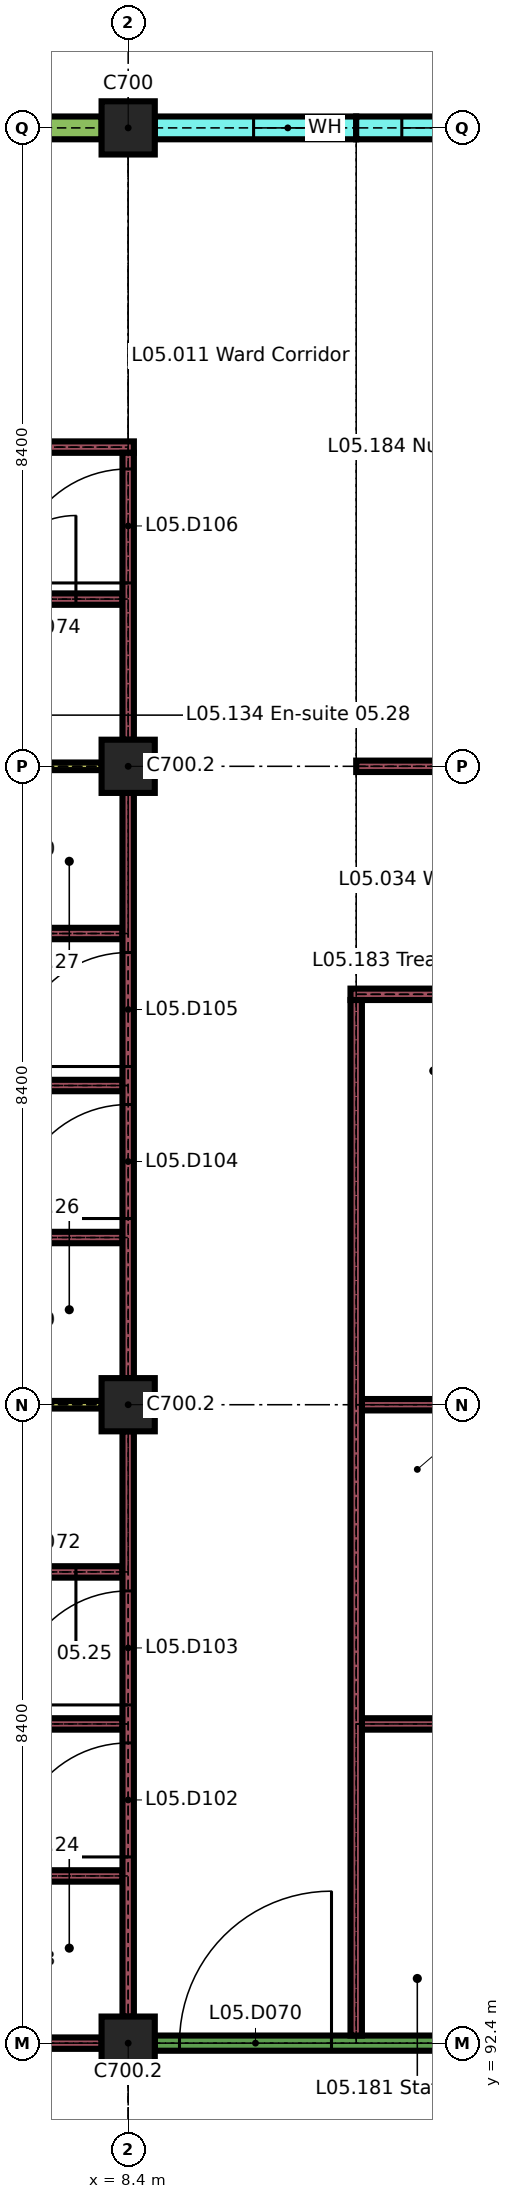
"""IFC4 building model, lengths in metres.
Left out: names, types, materials, properties, quantities, classifications, styles, units other than length and angle.
Written with IfcOpenShell. Run it as: python <this file> out.ifc"""

import sys

from ifc_helpers import new_model, si_unit, direction, frame, frame_2d, origin, origin_2d, place, context, subcontext, project, spatial, rectangle, extrude, element, fill, save


model = new_model("IFC4")
c1 = context("Model", 3, precision=1e-05, world=origin(), true_north=direction((0.0, 1.0)))
c2 = subcontext(c1, "Body", "Model", "MODEL_VIEW")
j1 = project(units=[si_unit("LENGTHUNIT", "METRE"), si_unit("PLANEANGLEUNIT", "RADIAN")], contexts=[c1])
p1 = place(None, origin())
s1 = spatial("IfcSite", under=j1, at=p1, CompositionType="ELEMENT")
p2 = place(p1, origin())
s2 = spatial("IfcBuilding", under=s1, at=p2, CompositionType="ELEMENT")
p3 = place(p2, frame((0.0, 0.0, 22.5)))
s3 = spatial("IfcBuildingStorey", under=s2, at=p3, CompositionType="ELEMENT", Elevation=22.5)
for number, where, z_axis, x_axis in (
    (1, (8.4, 92.4, 0.0), (0.0, 0.0, 1.0), (1.0, 0.0, 0.0)),
    (2, (8.4, 100.8, 0.0), (0.0, 0.0, 1.0), (1.0, 0.0, 0.0)),
    (3, (8.4, 109.2, 0.0), (0.0, 0.0, 1.0), (1.0, 0.0, 0.0)),
    (4, (8.4, 117.6, 0.0), (0.0, 0.0, 1.0), (1.0, 0.0, 0.0)),
):
    element("IfcColumn", number, at=place(p3, frame(where, z_axis=z_axis, x_axis=x_axis)), inside=s3, PredefinedType="COLUMN", context=c2, shape_type="SweptSolid", body=[
        extrude(rectangle(XDim=0.7, YDim=0.7, at=origin_2d()), origin(), (0.0, 0.0, 1.0), 3.26),
    ])
p4 = place(p3, frame((0.35, 117.6, 0.0), z_axis=(0.0, 0.0, 1.0), x_axis=(1.0, 0.0, 0.0)))
e5 = element("IfcWall", 5, at=p4, inside=s3, PredefinedType="SOLIDWALL", context=c2, shape_type="SweptSolid", body=[
    extrude(rectangle(XDim=7.7, YDim=0.3, at=frame_2d((3.85, 0.0))), origin(), (0.0, 0.0, 1.0), 2.96),
])
p5 = place(p4, frame((0.85, 0.0, 1.05)))
e6 = element("IfcOpeningElement", 6, at=p5, cuts=e5, PredefinedType="OPENING", context=c2, shape_type="SweptSolid", body=[
    extrude(rectangle(XDim=1.8, YDim=1.2, at=frame_2d((0.9, 0.6))), frame((0.0, 0.16, 0.0), z_axis=(0.0, -1.0, 0.0), x_axis=(1.0, 0.0, 0.0)), (0.0, 0.0, 1.0), 0.32),
])
p6 = place(p4, frame((5.05, 0.0, 1.05)))
e7 = element("IfcOpeningElement", 7, at=p6, cuts=e5, PredefinedType="OPENING", context=c2, shape_type="SweptSolid", body=[
    extrude(rectangle(XDim=1.8, YDim=1.2, at=frame_2d((0.9, 0.6))), frame((0.0, 0.16, 0.0), z_axis=(0.0, -1.0, 0.0), x_axis=(1.0, 0.0, 0.0)), (0.0, 0.0, 1.0), 0.32),
])
p7 = place(p3, frame((8.75, 117.6, 0.0), z_axis=(0.0, 0.0, 1.0), x_axis=(1.0, 0.0, 0.0)))
e8 = element("IfcWall", 8, at=p7, inside=s3, PredefinedType="SOLIDWALL", context=c2, shape_type="SweptSolid", body=[
    extrude(rectangle(XDim=2.65, YDim=0.3, at=frame_2d((1.325, 0.0))), origin(), (0.0, 0.0, 1.0), 3.26),
])
p8 = place(p7, frame((1.3, 0.0, 0.9)))
e9 = element("IfcOpeningElement", 9, at=p8, cuts=e8, PredefinedType="OPENING", context=c2, shape_type="SweptSolid", body=[
    extrude(rectangle(XDim=0.9, YDim=1.5, at=frame_2d((0.45, 0.75))), frame((0.0, 0.16, 0.0), z_axis=(0.0, -1.0, 0.0), x_axis=(1.0, 0.0, 0.0)), (0.0, 0.0, 1.0), 0.32),
])
p9 = place(p3, frame((11.4, 117.6, 0.0), z_axis=(0.0, 0.0, 1.0), x_axis=(1.0, 0.0, 0.0)))
e10 = element("IfcWall", 10, at=p9, inside=s3, PredefinedType="SOLIDWALL", context=c2, shape_type="SweptSolid", body=[
    extrude(rectangle(XDim=2.4, YDim=0.3, at=frame_2d((1.2, 0.0))), origin(), (0.0, 0.0, 1.0), 3.26),
])
p10 = place(p9, frame((0.6, 0.0, 0.9)))
e11 = element("IfcOpeningElement", 11, at=p10, cuts=e10, PredefinedType="OPENING", context=c2, shape_type="SweptSolid", body=[
    extrude(rectangle(XDim=1.2, YDim=1.5, at=frame_2d((0.6, 0.75))), frame((0.0, 0.16, 0.0), z_axis=(0.0, -1.0, 0.0), x_axis=(1.0, 0.0, 0.0)), (0.0, 0.0, 1.0), 0.32),
])
p11 = place(p3, frame((0.35, 92.4, 0.0), z_axis=(0.0, 0.0, 1.0), x_axis=(1.0, 0.0, 0.0)))
e12 = element("IfcWall", 12, at=p11, inside=s3, PredefinedType="PARTITIONING", context=c2, shape_type="SweptSolid", body=[
    extrude(rectangle(XDim=7.7, YDim=0.15, at=frame_2d((3.85, 0.0))), origin(), (0.0, 0.0, 1.0), 3.26),
])
p12 = place(p3, frame((8.75, 92.4, 0.0), z_axis=(0.0, 0.0, 1.0), x_axis=(1.0, 0.0, 0.0)))
e13 = element("IfcWall", 13, at=p12, inside=s3, PredefinedType="PARTITIONING", context=c2, shape_type="SweptSolid", body=[
    extrude(rectangle(XDim=7.7, YDim=0.2, at=frame_2d((3.85, 0.0))), origin(), (0.0, 0.0, 1.0), 3.26),
])
p13 = place(p12, frame((0.325, 0.0, 0.0)))
e14 = element("IfcOpeningElement", 14, at=p13, cuts=e13, PredefinedType="OPENING", context=c2, shape_type="SweptSolid", body=[
    extrude(rectangle(XDim=2.0, YDim=2.4, at=frame_2d((1.0, 1.2))), frame((0.0, 0.11, 0.0), z_axis=(0.0, -1.0, 0.0), x_axis=(1.0, 0.0, 0.0)), (0.0, 0.0, 1.0), 0.22),
])
p14 = place(p12, frame((5.375, 0.0, 0.0)))
e15 = element("IfcOpeningElement", 15, at=p14, cuts=e13, PredefinedType="OPENING", context=c2, shape_type="SweptSolid", body=[
    extrude(rectangle(XDim=2.0, YDim=2.4, at=frame_2d((1.0, 1.2))), frame((0.0, 0.11, 0.0), z_axis=(0.0, -1.0, 0.0), x_axis=(1.0, 0.0, 0.0)), (0.0, 0.0, 1.0), 0.22),
])
p15 = place(p3, frame((5.925, 94.6, 0.0), z_axis=(0.0, 0.0, 1.0), x_axis=(1.0, 0.0, 0.0)))
e16 = element("IfcWall", 16, at=p15, inside=s3, PredefinedType="PARTITIONING", context=c2, shape_type="SweptSolid", body=[
    extrude(rectangle(XDim=2.4, YDim=0.15, at=frame_2d((1.2, 0.0))), origin(), (0.0, 0.0, 1.0), 3.26),
])
p16 = place(p3, frame((0.15, 96.6, 0.0), z_axis=(0.0, 0.0, 1.0), x_axis=(1.0, 0.0, 0.0)))
e17 = element("IfcWall", 17, at=p16, inside=s3, PredefinedType="PARTITIONING", context=c2, shape_type="SweptSolid", body=[
    extrude(rectangle(XDim=8.175, YDim=0.15, at=frame_2d((4.087, 0.0))), origin(), (0.0, 0.0, 1.0), 3.26),
])
p17 = place(p3, frame((11.475, 96.6, 0.0), z_axis=(0.0, 0.0, 1.0), x_axis=(1.0, 0.0, 0.0)))
e18 = element("IfcWall", 18, at=p17, inside=s3, PredefinedType="PARTITIONING", context=c2, shape_type="SweptSolid", body=[
    extrude(rectangle(XDim=2.25, YDim=0.15, at=frame_2d((1.125, 0.0))), origin(), (0.0, 0.0, 1.0), 3.26),
])
p18 = place(p3, frame((5.925, 98.6, 0.0), z_axis=(0.0, 0.0, 1.0), x_axis=(1.0, 0.0, 0.0)))
e19 = element("IfcWall", 19, at=p18, inside=s3, PredefinedType="PARTITIONING", context=c2, shape_type="SweptSolid", body=[
    extrude(rectangle(XDim=2.4, YDim=0.15, at=frame_2d((1.2, 0.0))), origin(), (0.0, 0.0, 1.0), 3.26),
])
p19 = place(p18, frame((0.688, 0.0, 0.0)))
e20 = element("IfcOpeningElement", 20, at=p19, cuts=e19, PredefinedType="OPENING", context=c2, shape_type="SweptSolid", body=[
    extrude(rectangle(XDim=1.1, YDim=2.1, at=frame_2d((0.55, 1.05))), frame((0.0, 0.085, 0.0), z_axis=(0.0, -1.0, 0.0), x_axis=(1.0, 0.0, 0.0)), (0.0, 0.0, 1.0), 0.17),
])
p20 = place(p3, frame((6.0, 100.8, 0.0), z_axis=(0.0, 0.0, 1.0), x_axis=(1.0, 0.0, 0.0)))
e21 = element("IfcWall", 21, at=p20, inside=s3, PredefinedType="PARTITIONING", context=c2, shape_type="SweptSolid", body=[
    extrude(rectangle(XDim=2.05, YDim=0.1, at=frame_2d((1.025, 0.0))), origin(), (0.0, 0.0, 1.0), 3.26),
])
p21 = place(p3, frame((11.475, 100.8, 0.0), z_axis=(0.0, 0.0, 1.0), x_axis=(1.0, 0.0, 0.0)))
e22 = element("IfcWall", 22, at=p21, inside=s3, PredefinedType="PARTITIONING", context=c2, shape_type="SweptSolid", body=[
    extrude(rectangle(XDim=2.25, YDim=0.15, at=frame_2d((1.125, 0.0))), origin(), (0.0, 0.0, 1.0), 3.26),
])
p22 = place(p3, frame((5.925, 103.0, 0.0), z_axis=(0.0, 0.0, 1.0), x_axis=(1.0, 0.0, 0.0)))
e23 = element("IfcWall", 23, at=p22, inside=s3, PredefinedType="PARTITIONING", context=c2, shape_type="SweptSolid", body=[
    extrude(rectangle(XDim=2.4, YDim=0.15, at=frame_2d((1.2, 0.0))), origin(), (0.0, 0.0, 1.0), 3.26),
])
p23 = place(p3, frame((0.15, 105.0, 0.0), z_axis=(0.0, 0.0, 1.0), x_axis=(1.0, 0.0, 0.0)))
e24 = element("IfcWall", 24, at=p23, inside=s3, PredefinedType="PARTITIONING", context=c2, shape_type="SweptSolid", body=[
    extrude(rectangle(XDim=8.175, YDim=0.15, at=frame_2d((4.087, 0.0))), origin(), (0.0, 0.0, 1.0), 3.26),
])
p24 = place(p3, frame((11.325, 106.2, 0.0), z_axis=(0.0, 0.0, 1.0), x_axis=(1.0, 0.0, 0.0)))
e25 = element("IfcWall", 25, at=p24, inside=s3, PredefinedType="PARTITIONING", context=c2, shape_type="SweptSolid", body=[
    extrude(rectangle(XDim=2.55, YDim=0.15, at=frame_2d((1.275, 0.0))), origin(), (0.0, 0.0, 1.0), 3.26),
])
p25 = place(p3, frame((5.925, 107.0, 0.0), z_axis=(0.0, 0.0, 1.0), x_axis=(1.0, 0.0, 0.0)))
e26 = element("IfcWall", 26, at=p25, inside=s3, PredefinedType="PARTITIONING", context=c2, shape_type="SweptSolid", body=[
    extrude(rectangle(XDim=2.4, YDim=0.15, at=frame_2d((1.2, 0.0))), origin(), (0.0, 0.0, 1.0), 3.26),
])
p26 = place(p3, frame((6.0, 109.2, 0.0), z_axis=(0.0, 0.0, 1.0), x_axis=(1.0, 0.0, 0.0)))
e27 = element("IfcWall", 27, at=p26, inside=s3, PredefinedType="PARTITIONING", context=c2, shape_type="SweptSolid", body=[
    extrude(rectangle(XDim=2.05, YDim=0.1, at=frame_2d((1.025, 0.0))), origin(), (0.0, 0.0, 1.0), 3.26),
])
p27 = place(p3, frame((11.4, 109.2, 0.0), z_axis=(0.0, 0.0, 1.0), x_axis=(1.0, 0.0, 0.0)))
e28 = element("IfcWall", 28, at=p27, inside=s3, PredefinedType="PARTITIONING", context=c2, shape_type="SweptSolid", body=[
    extrude(rectangle(XDim=2.475, YDim=0.15, at=frame_2d((1.238, 0.0))), origin(), (0.0, 0.0, 1.0), 3.26),
])
p28 = place(p3, frame((5.925, 111.4, 0.0), z_axis=(0.0, 0.0, 1.0), x_axis=(1.0, 0.0, 0.0)))
e29 = element("IfcWall", 29, at=p28, inside=s3, PredefinedType="PARTITIONING", context=c2, shape_type="SweptSolid", body=[
    extrude(rectangle(XDim=2.4, YDim=0.15, at=frame_2d((1.2, 0.0))), origin(), (0.0, 0.0, 1.0), 3.26),
])
p29 = place(p28, frame((0.688, 0.0, 0.0)))
e30 = element("IfcOpeningElement", 30, at=p29, cuts=e29, PredefinedType="OPENING", context=c2, shape_type="SweptSolid", body=[
    extrude(rectangle(XDim=1.1, YDim=2.1, at=frame_2d((0.55, 1.05))), frame((0.0, 0.085, 0.0), z_axis=(0.0, -1.0, 0.0), x_axis=(1.0, 0.0, 0.0)), (0.0, 0.0, 1.0), 0.17),
])
p30 = place(p3, frame((0.15, 113.4, 0.0), z_axis=(0.0, 0.0, 1.0), x_axis=(1.0, 0.0, 0.0)))
e31 = element("IfcWall", 31, at=p30, inside=s3, PredefinedType="PARTITIONING", context=c2, shape_type="SweptSolid", body=[
    extrude(rectangle(XDim=8.325, YDim=0.15, at=frame_2d((4.163, 0.0))), origin(), (0.0, 0.0, 1.0), 3.26),
])
p31 = place(p3, frame((8.4, 92.75, 0.0), z_axis=(0.0, 0.0, 1.0), x_axis=(0.0, 1.0, 0.0)))
e32 = element("IfcWall", 32, at=p31, inside=s3, PredefinedType="PARTITIONING", context=c2, shape_type="SweptSolid", body=[
    extrude(rectangle(XDim=7.7, YDim=0.15, at=frame_2d((3.85, 0.0))), origin(), (0.0, 0.0, 1.0), 3.26),
])
p32 = place(p31, frame((2.1, 0.0, 0.0)))
e33 = element("IfcOpeningElement", 33, at=p32, cuts=e32, PredefinedType="OPENING", context=c2, shape_type="SweptSolid", body=[
    extrude(rectangle(XDim=1.5, YDim=2.4, at=frame_2d((0.75, 1.2))), frame((0.0, 0.085, 0.0), z_axis=(0.0, -1.0, 0.0), x_axis=(1.0, 0.0, 0.0)), (0.0, 0.0, 1.0), 0.17),
])
p33 = place(p31, frame((4.1, 0.0, 0.0)))
e34 = element("IfcOpeningElement", 34, at=p33, cuts=e32, PredefinedType="OPENING", context=c2, shape_type="SweptSolid", body=[
    extrude(rectangle(XDim=1.5, YDim=2.4, at=frame_2d((0.75, 1.2))), frame((0.0, 0.085, 0.0), z_axis=(0.0, -1.0, 0.0), x_axis=(1.0, 0.0, 0.0)), (0.0, 0.0, 1.0), 0.17),
])
p34 = place(p3, frame((8.4, 101.15, 0.0), z_axis=(0.0, 0.0, 1.0), x_axis=(0.0, 1.0, 0.0)))
e35 = element("IfcWall", 35, at=p34, inside=s3, PredefinedType="PARTITIONING", context=c2, shape_type="SweptSolid", body=[
    extrude(rectangle(XDim=7.7, YDim=0.15, at=frame_2d((3.85, 0.0))), origin(), (0.0, 0.0, 1.0), 3.26),
])
p35 = place(p34, frame((2.1, 0.0, 0.0)))
e36 = element("IfcOpeningElement", 36, at=p35, cuts=e35, PredefinedType="OPENING", context=c2, shape_type="SweptSolid", body=[
    extrude(rectangle(XDim=1.5, YDim=2.4, at=frame_2d((0.75, 1.2))), frame((0.0, 0.085, 0.0), z_axis=(0.0, -1.0, 0.0), x_axis=(1.0, 0.0, 0.0)), (0.0, 0.0, 1.0), 0.17),
])
p36 = place(p34, frame((4.1, 0.0, 0.0)))
e37 = element("IfcOpeningElement", 37, at=p36, cuts=e35, PredefinedType="OPENING", context=c2, shape_type="SweptSolid", body=[
    extrude(rectangle(XDim=1.5, YDim=2.4, at=frame_2d((0.75, 1.2))), frame((0.0, 0.085, 0.0), z_axis=(0.0, -1.0, 0.0), x_axis=(1.0, 0.0, 0.0)), (0.0, 0.0, 1.0), 0.17),
])
p37 = place(p3, frame((8.4, 109.55, 0.0), z_axis=(0.0, 0.0, 1.0), x_axis=(0.0, 1.0, 0.0)))
e38 = element("IfcWall", 38, at=p37, inside=s3, PredefinedType="PARTITIONING", context=c2, shape_type="SweptSolid", body=[
    extrude(rectangle(XDim=3.775, YDim=0.15, at=frame_2d((1.887, 0.0))), origin(), (0.0, 0.0, 1.0), 3.26),
])
p38 = place(p37, frame((2.062, 0.0, 0.0)))
e39 = element("IfcOpeningElement", 39, at=p38, cuts=e38, PredefinedType="OPENING", context=c2, shape_type="SweptSolid", body=[
    extrude(rectangle(XDim=1.5, YDim=2.4, at=frame_2d((0.75, 1.2))), frame((0.0, 0.085, 0.0), z_axis=(0.0, -1.0, 0.0), x_axis=(1.0, 0.0, 0.0)), (0.0, 0.0, 1.0), 0.17),
])
p39 = place(p3, frame((11.4, 92.5, 0.0), z_axis=(0.0, 0.0, 1.0), x_axis=(0.0, 1.0, 0.0)))
e40 = element("IfcWall", 40, at=p39, inside=s3, PredefinedType="PARTITIONING", context=c2, shape_type="SweptSolid", body=[
    extrude(rectangle(XDim=13.625, YDim=0.15, at=frame_2d((6.812, 0.0))), origin(), (0.0, 0.0, 1.0), 3.26),
])
p40 = place(p8, origin())
e41 = element("IfcWindow", 41, at=p40, inside=s3, PartitioningType="SINGLE_PANEL", PredefinedType="WINDOW", context=c2, shape_type="SweptSolid", body=[
    extrude(rectangle(XDim=0.9, YDim=1.5, at=frame_2d((0.45, 0.75))), frame((0.0, 0.03, 0.0), z_axis=(0.0, -1.0, 0.0), x_axis=(1.0, 0.0, 0.0)), (0.0, 0.0, 1.0), 0.06),
])
fill(e9, e41)
p41 = place(p10, origin())
e42 = element("IfcWindow", 42, at=p41, inside=s3, PartitioningType="SINGLE_PANEL", PredefinedType="WINDOW", context=c2, shape_type="SweptSolid", body=[
    extrude(rectangle(XDim=1.2, YDim=1.5, at=frame_2d((0.6, 0.75))), frame((0.0, 0.03, 0.0), z_axis=(0.0, -1.0, 0.0), x_axis=(1.0, 0.0, 0.0)), (0.0, 0.0, 1.0), 0.06),
])
fill(e11, e42)
p42 = place(p13, origin())
e43 = element("IfcDoor", 43, at=p42, inside=s3, OperationType="SINGLE_SWING_LEFT", PredefinedType="DOOR", context=c2, shape_type="SweptSolid", body=[
    extrude(rectangle(XDim=2.0, YDim=2.4, at=frame_2d((1.0, 1.2))), frame((0.0, 0.03, 0.0), z_axis=(0.0, -1.0, 0.0), x_axis=(1.0, 0.0, 0.0)), (0.0, 0.0, 1.0), 0.06),
])
fill(e14, e43)
p43 = place(p19, origin())
e44 = element("IfcDoor", 44, at=p43, inside=s3, OperationType="SINGLE_SWING_RIGHT", PredefinedType="DOOR", context=c2, shape_type="SweptSolid", body=[
    extrude(rectangle(XDim=1.1, YDim=2.1, at=frame_2d((0.55, 1.05))), frame((0.0, 0.025, 0.0), z_axis=(0.0, -1.0, 0.0), x_axis=(1.0, 0.0, 0.0)), (0.0, 0.0, 1.0), 0.05),
])
fill(e20, e44)
p44 = place(p29, origin())
e45 = element("IfcDoor", 45, at=p44, inside=s3, OperationType="SINGLE_SWING_LEFT", PredefinedType="DOOR", context=c2, shape_type="SweptSolid", body=[
    extrude(rectangle(XDim=1.1, YDim=2.1, at=frame_2d((0.55, 1.05))), frame((0.0, 0.025, 0.0), z_axis=(0.0, -1.0, 0.0), x_axis=(1.0, 0.0, 0.0)), (0.0, 0.0, 1.0), 0.05),
])
fill(e30, e45)
p45 = place(p32, origin())
e46 = element("IfcDoor", 46, at=p45, inside=s3, OperationType="SINGLE_SWING_RIGHT", PredefinedType="DOOR", context=c2, shape_type="SweptSolid", body=[
    extrude(rectangle(XDim=1.5, YDim=2.4, at=frame_2d((0.75, 1.2))), frame((0.0, 0.03, 0.0), z_axis=(0.0, -1.0, 0.0), x_axis=(1.0, 0.0, 0.0)), (0.0, 0.0, 1.0), 0.06),
])
fill(e33, e46)
p46 = place(p33, origin())
e47 = element("IfcDoor", 47, at=p46, inside=s3, OperationType="SINGLE_SWING_RIGHT", PredefinedType="DOOR", context=c2, shape_type="SweptSolid", body=[
    extrude(rectangle(XDim=1.5, YDim=2.4, at=frame_2d((0.75, 1.2))), frame((0.0, 0.03, 0.0), z_axis=(0.0, -1.0, 0.0), x_axis=(1.0, 0.0, 0.0)), (0.0, 0.0, 1.0), 0.06),
])
fill(e34, e47)
p47 = place(p35, origin())
e48 = element("IfcDoor", 48, at=p47, inside=s3, OperationType="SINGLE_SWING_RIGHT", PredefinedType="DOOR", context=c2, shape_type="SweptSolid", body=[
    extrude(rectangle(XDim=1.5, YDim=2.4, at=frame_2d((0.75, 1.2))), frame((0.0, 0.03, 0.0), z_axis=(0.0, -1.0, 0.0), x_axis=(1.0, 0.0, 0.0)), (0.0, 0.0, 1.0), 0.06),
])
fill(e36, e48)
p48 = place(p36, origin())
e49 = element("IfcDoor", 49, at=p48, inside=s3, OperationType="SINGLE_SWING_RIGHT", PredefinedType="DOOR", context=c2, shape_type="SweptSolid", body=[
    extrude(rectangle(XDim=1.5, YDim=2.4, at=frame_2d((0.75, 1.2))), frame((0.0, 0.03, 0.0), z_axis=(0.0, -1.0, 0.0), x_axis=(1.0, 0.0, 0.0)), (0.0, 0.0, 1.0), 0.06),
])
fill(e37, e49)
p49 = place(p38, origin())
e50 = element("IfcDoor", 50, at=p49, inside=s3, OperationType="SINGLE_SWING_RIGHT", PredefinedType="DOOR", context=c2, shape_type="SweptSolid", body=[
    extrude(rectangle(XDim=1.5, YDim=2.4, at=frame_2d((0.75, 1.2))), frame((0.0, 0.03, 0.0), z_axis=(0.0, -1.0, 0.0), x_axis=(1.0, 0.0, 0.0)), (0.0, 0.0, 1.0), 0.06),
])
fill(e39, e50)
save(model, sys.argv[1])
